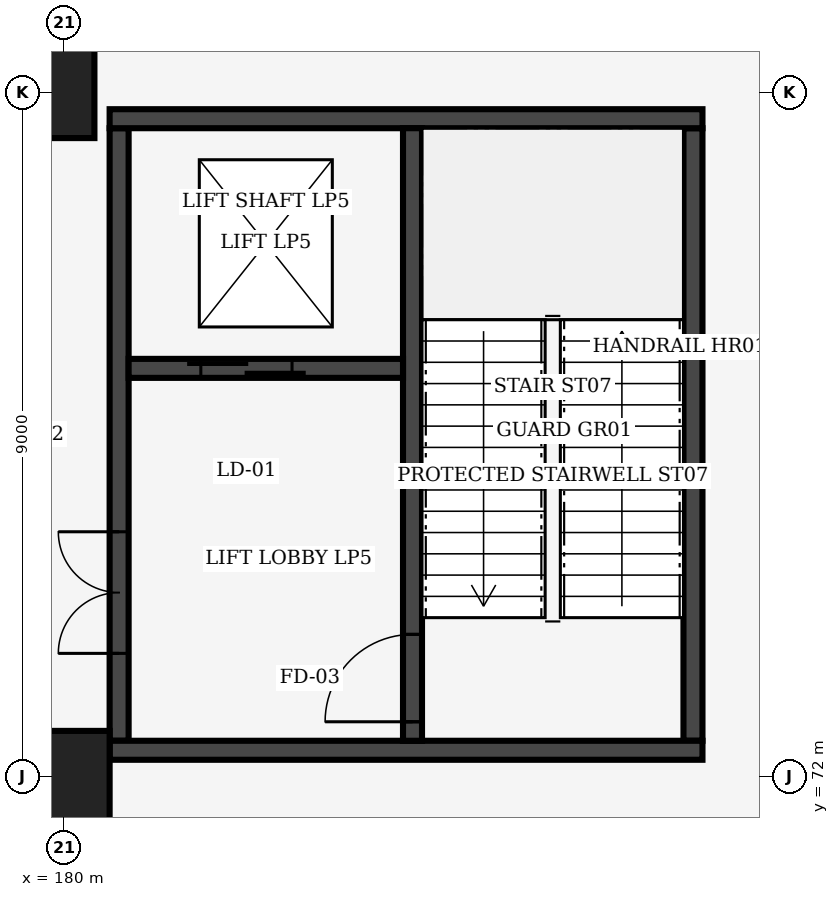
"""IFC4 building model, lengths in metres.
Left out: names, types, materials, properties, quantities, classifications, styles, units other than length and angle.
Written with IfcOpenShell. Run it as: python <this file> out.ifc"""

import sys

from ifc_helpers import new_model, si_unit, direction, frame, frame_2d, origin, origin_2d, place, context, subcontext, project, spatial, rectangle, extrude, element, fill, save


model = new_model("IFC4")
c1 = context("Model", 3, precision=1e-05, world=origin(), true_north=direction((0.0, 1.0)))
c2 = subcontext(c1, "Body", "Model", "MODEL_VIEW")
j1 = project(units=[si_unit("LENGTHUNIT", "METRE"), si_unit("PLANEANGLEUNIT", "RADIAN")], contexts=[c1])
p1 = place(None, origin())
s1 = spatial("IfcSite", under=j1, at=p1, CompositionType="ELEMENT")
p2 = place(p1, origin())
s2 = spatial("IfcBuilding", under=s1, at=p2, CompositionType="ELEMENT")
p3 = place(p2, frame((0.0, 0.0, -5.0)))
s3 = spatial("IfcBuildingStorey", under=s2, at=p3, CompositionType="ELEMENT", Elevation=-5.0)
p4 = place(p3, frame((180.0, 72.0, 0.0), z_axis=(0.0, 0.0, 1.0), x_axis=(1.0, 0.0, 0.0)))
e1 = element("IfcColumn", 1, at=p4, inside=s3, PredefinedType="COLUMN", context=c2, shape_type="SweptSolid", body=[
    extrude(rectangle(XDim=1.2, YDim=1.2, at=origin_2d()), origin(), (0.0, 0.0, 1.0), 5.0),
])
p5 = place(p3, frame((180.0, 81.0, 0.0), z_axis=(0.0, 0.0, 1.0), x_axis=(1.0, 0.0, 0.0)))
e2 = element("IfcColumn", 2, at=p5, inside=s3, PredefinedType="COLUMN", context=c2, shape_type="SweptSolid", body=[
    extrude(rectangle(XDim=0.8, YDim=1.2, at=origin_2d()), origin(), (0.0, 0.0, 1.0), 5.0),
])
p6 = place(p3, frame((180.725, 72.47, 0.0), z_axis=(0.0, 0.0, 1.0), x_axis=(0.0, 1.0, 0.0)))
e3 = element("IfcWall", 3, at=p6, inside=s3, PredefinedType="SHEAR", context=c2, shape_type="SweptSolid", body=[
    extrude(rectangle(XDim=8.06, YDim=0.25, at=frame_2d((4.03, 0.0))), origin(), (0.0, 0.0, 1.0), 4.64),
])
p7 = place(p6, frame((1.15, 0.0, 0.0)))
e4 = element("IfcOpeningElement", 4, at=p7, cuts=e3, PredefinedType="OPENING", context=c2, shape_type="SweptSolid", body=[
    extrude(rectangle(XDim=1.6, YDim=2.2, at=frame_2d((0.8, 1.1))), frame((0.0, 0.135, 0.0), z_axis=(0.0, -1.0, 0.0), x_axis=(1.0, 0.0, 0.0)), (0.0, 0.0, 1.0), 0.27),
])
p8 = place(p3, frame((188.275, 72.47, 0.0), z_axis=(0.0, 0.0, 1.0), x_axis=(0.0, 1.0, 0.0)))
e5 = element("IfcWall", 5, at=p8, inside=s3, PredefinedType="SHEAR", context=c2, shape_type="SweptSolid", body=[
    extrude(rectangle(XDim=8.06, YDim=0.25, at=frame_2d((4.03, 0.0))), origin(), (0.0, 0.0, 1.0), 4.64),
])
for number, where, z_axis, x_axis in (
    (6, (180.6, 72.345, 0.0), (0.0, 0.0, 1.0), (1.0, 0.0, 0.0)),
    (7, (180.6, 80.655, 0.0), (0.0, 0.0, 1.0), (1.0, 0.0, 0.0)),
):
    element("IfcWall", number, at=place(p3, frame(where, z_axis=z_axis, x_axis=x_axis)), inside=s3, PredefinedType="SHEAR", context=c2, shape_type="SweptSolid", body=[
        extrude(rectangle(XDim=7.8, YDim=0.25, at=frame_2d((3.9, 0.0))), origin(), (0.0, 0.0, 1.0), 4.64),
    ])
p9 = place(p3, frame((184.585, 72.47, 0.0), z_axis=(0.0, 0.0, 1.0), x_axis=(0.0, 1.0, 0.0)))
e8 = element("IfcWall", 8, at=p9, inside=s3, PredefinedType="SHEAR", context=c2, shape_type="SweptSolid", body=[
    extrude(rectangle(XDim=8.06, YDim=0.25, at=frame_2d((4.03, 0.0))), origin(), (0.0, 0.0, 1.0), 4.64),
])
p10 = place(p9, frame((0.25, 0.0, 0.0)))
e9 = element("IfcOpeningElement", 9, at=p10, cuts=e8, PredefinedType="OPENING", context=c2, shape_type="SweptSolid", body=[
    extrude(rectangle(XDim=1.15, YDim=2.15, at=frame_2d((0.575, 1.075))), frame((0.0, 0.135, 0.0), z_axis=(0.0, -1.0, 0.0), x_axis=(1.0, 0.0, 0.0)), (0.0, 0.0, 1.0), 0.27),
])
p11 = place(p3, frame((180.85, 77.37, 0.0), z_axis=(0.0, 0.0, 1.0), x_axis=(1.0, 0.0, 0.0)))
e10 = element("IfcWall", 10, at=p11, inside=s3, PredefinedType="SHEAR", context=c2, shape_type="SweptSolid", body=[
    extrude(rectangle(XDim=3.61, YDim=0.25, at=frame_2d((1.805, 0.0))), origin(), (0.0, 0.0, 1.0), 4.64),
])
p12 = place(p11, frame((0.95, 0.0, 0.0)))
e11 = element("IfcOpeningElement", 11, at=p12, cuts=e10, PredefinedType="OPENING", context=c2, shape_type="SweptSolid", body=[
    extrude(rectangle(XDim=1.2, YDim=2.2, at=frame_2d((0.6, 1.1))), frame((0.0, 0.135, 0.0), z_axis=(0.0, -1.0, 0.0), x_axis=(1.0, 0.0, 0.0)), (0.0, 0.0, 1.0), 0.27),
])
p13 = place(p10, origin())
e12 = element("IfcDoor", 12, at=p13, inside=s3, OperationType="SINGLE_SWING_LEFT", PredefinedType="DOOR", context=c2, shape_type="SweptSolid", body=[
    extrude(rectangle(XDim=1.15, YDim=2.15, at=frame_2d((0.575, 1.075))), frame((0.0, 0.025, 0.0), z_axis=(0.0, -1.0, 0.0), x_axis=(1.0, 0.0, 0.0)), (0.0, 0.0, 1.0), 0.05),
])
fill(e9, e12)
p14 = place(p12, origin())
e13 = element("IfcDoor", 13, at=p14, inside=s3, OperationType="DOUBLE_DOOR_SLIDING", PredefinedType="DOOR", context=c2, shape_type="SweptSolid", body=[
    extrude(rectangle(XDim=1.2, YDim=2.2, at=frame_2d((0.6, 1.1))), frame((0.0, 0.025, 0.0), z_axis=(0.0, -1.0, 0.0), x_axis=(1.0, 0.0, 0.0)), (0.0, 0.0, 1.0), 0.05),
])
fill(e11, e13)
p15 = place(p7, origin())
e14 = element("IfcDoor", 14, at=p15, inside=s3, OperationType="DOUBLE_DOOR_SINGLE_SWING", PredefinedType="DOOR", context=c2, shape_type="SweptSolid", body=[
    extrude(rectangle(XDim=1.6, YDim=2.2, at=frame_2d((0.8, 1.1))), frame((0.0, 0.025, 0.0), z_axis=(0.0, -1.0, 0.0), x_axis=(1.0, 0.0, 0.0)), (0.0, 0.0, 1.0), 0.05),
])
fill(e4, e14)
save(model, sys.argv[1])
